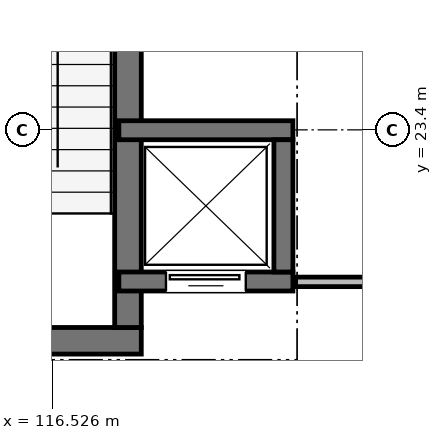
"""IFC4 building model, lengths in metres.
Left out: names, types, materials, properties, quantities, classifications, styles, units other than length and angle.
Written with IfcOpenShell. Run it as: python <this file> out.ifc"""

import sys

from ifc_helpers import new_model, si_unit, direction, frame, frame_2d, origin, place, context, subcontext, project, spatial, rectangle, extrude, element, fill, save


model = new_model("IFC4")
c1 = context("Model", 3, precision=1e-05, world=origin(), true_north=direction((0.0, 1.0)))
c2 = subcontext(c1, "Body", "Model", "MODEL_VIEW")
j1 = project(units=[si_unit("LENGTHUNIT", "METRE"), si_unit("PLANEANGLEUNIT", "RADIAN")], contexts=[c1])
p1 = place(None, origin())
s1 = spatial("IfcSite", under=j1, at=p1, CompositionType="ELEMENT")
p2 = place(p1, origin())
s2 = spatial("IfcBuilding", under=s1, at=p2, CompositionType="ELEMENT")
p3 = place(p2, frame((0.0, 0.0, 15.0)))
s3 = spatial("IfcBuildingStorey", under=s2, at=p3, CompositionType="ELEMENT", Elevation=15.0)
p4 = place(p3, frame((113.85, 20.625, 0.0), z_axis=(0.0, 0.0, 1.0), x_axis=(1.0, 0.0, 0.0)))
e1 = element("IfcWall", 1, at=p4, inside=s3, PredefinedType="SHEAR", context=c2, shape_type="SweptSolid", body=[
    extrude(rectangle(XDim=3.85, YDim=0.35, at=frame_2d((1.925, 0.0))), origin(), (0.0, 0.0, 1.0), 4.28),
])
p5 = place(p4, frame((0.45, 0.0, 0.0)))
e2 = element("IfcOpeningElement", 2, at=p5, cuts=e1, PredefinedType="OPENING", context=c2, shape_type="SweptSolid", body=[
    extrude(rectangle(XDim=1.5, YDim=2.2, at=frame_2d((0.75, 1.1))), frame((0.0, 0.185, 0.0), z_axis=(0.0, -1.0, 0.0), x_axis=(1.0, 0.0, 0.0)), (0.0, 0.0, 1.0), 0.37),
])
p6 = place(p3, frame((117.525, 20.8, 0.0), z_axis=(0.0, 0.0, 1.0), x_axis=(0.0, 1.0, 0.0)))
e3 = element("IfcWall", 3, at=p6, inside=s3, PredefinedType="SHEAR", context=c2, shape_type="SweptSolid", body=[
    extrude(rectangle(XDim=7.05, YDim=0.35, at=frame_2d((3.525, 0.0))), origin(), (0.0, 0.0, 1.0), 4.28),
])
p7 = place(p3, frame((117.405, 21.405, 0.0), z_axis=(0.0, 0.0, 1.0), x_axis=(1.0, 0.0, 0.0)))
e4 = element("IfcWall", 4, at=p7, inside=s3, PredefinedType="SHEAR", context=c2, shape_type="SweptSolid", body=[
    extrude(rectangle(XDim=2.29, YDim=0.25, at=frame_2d((1.145, 0.0))), origin(), (0.0, 0.0, 1.0), 4.26),
])
p8 = place(p7, frame((0.62, 0.0, 0.0)))
e5 = element("IfcOpeningElement", 5, at=p8, cuts=e4, PredefinedType="OPENING", context=c2, shape_type="SweptSolid", body=[
    extrude(rectangle(XDim=1.05, YDim=2.15, at=frame_2d((0.525, 1.075))), frame((0.0, 0.135, 0.0), z_axis=(0.0, -1.0, 0.0), x_axis=(1.0, 0.0, 0.0)), (0.0, 0.0, 1.0), 0.27),
])
p9 = place(p3, frame((117.405, 23.395, 0.0), z_axis=(0.0, 0.0, 1.0), x_axis=(1.0, 0.0, 0.0)))
e6 = element("IfcWall", 6, at=p9, inside=s3, PredefinedType="SHEAR", context=c2, shape_type="SweptSolid", body=[
    extrude(rectangle(XDim=2.29, YDim=0.25, at=frame_2d((1.145, 0.0))), origin(), (0.0, 0.0, 1.0), 4.26),
])
p10 = place(p3, frame((119.57, 21.53, 0.0), z_axis=(0.0, 0.0, 1.0), x_axis=(0.0, 1.0, 0.0)))
e7 = element("IfcWall", 7, at=p10, inside=s3, PredefinedType="SHEAR", context=c2, shape_type="SweptSolid", body=[
    extrude(rectangle(XDim=1.74, YDim=0.25, at=frame_2d((0.87, 0.0))), origin(), (0.0, 0.0, 1.0), 4.26),
])
p11 = place(p3, frame((119.73, 21.4, 0.0), z_axis=(0.0, 0.0, 1.0), x_axis=(1.0, 0.0, 0.0)))
e8 = element("IfcWall", 8, at=p11, inside=s3, PredefinedType="PARTITIONING", context=c2, shape_type="SweptSolid", body=[
    extrude(rectangle(XDim=14.24, YDim=0.125, at=frame_2d((7.12, 0.0))), origin(), (0.0, 0.0, 1.0), 3.555),
])
p12 = place(p11, frame((6.53, 0.0, 0.0)))
e9 = element("IfcOpeningElement", 9, at=p12, cuts=e8, PredefinedType="OPENING", context=c2, shape_type="SweptSolid", body=[
    extrude(rectangle(XDim=1.18, YDim=2.2, at=frame_2d((0.59, 1.1))), frame((0.0, 0.073, 0.0), z_axis=(0.0, -1.0, 0.0), x_axis=(1.0, 0.0, 0.0)), (0.0, 0.0, 1.0), 0.145),
])
p13 = place(p8, frame((1.05, 0.0, 0.0), z_axis=(0.0, 0.0, 1.0), x_axis=(-1.0, 0.0, 0.0)))
e10 = element("IfcDoor", 10, at=p13, inside=s3, OperationType="SLIDING_TO_RIGHT", PredefinedType="DOOR", context=c2, shape_type="SweptSolid", body=[
    extrude(rectangle(XDim=1.05, YDim=2.15, at=frame_2d((0.525, 1.075))), frame((0.0, 0.025, 0.0), z_axis=(0.0, -1.0, 0.0), x_axis=(1.0, 0.0, 0.0)), (0.0, 0.0, 1.0), 0.05),
])
fill(e5, e10)
save(model, sys.argv[1])
